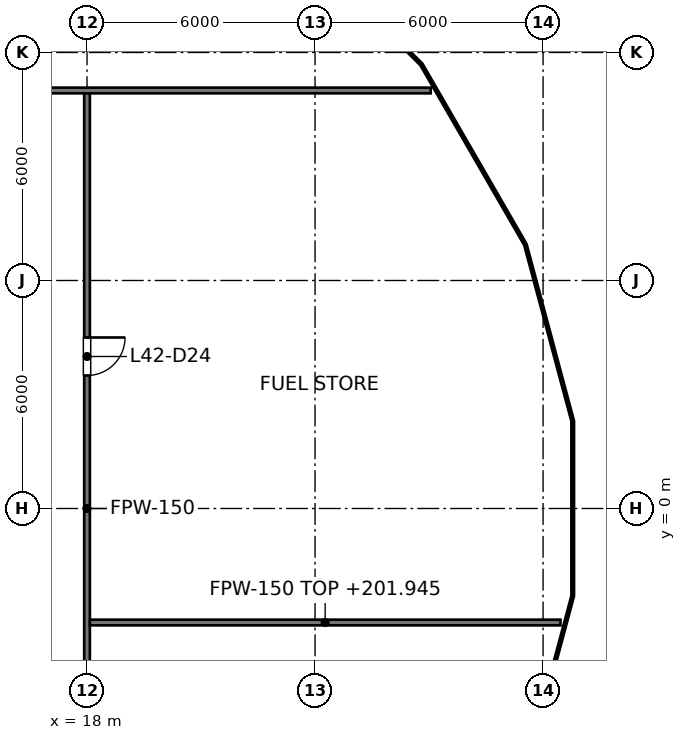
"""IFC4 building model, lengths in metres.
Left out: names, types, materials, properties, quantities, classifications, styles, units other than length and angle.
Written with IfcOpenShell. Run it as: python <this file> out.ifc"""

import sys

from ifc_helpers import new_model, si_unit, direction, frame, frame_2d, origin, place, context, subcontext, project, spatial, rectangle, extrude, element, fill, save


model = new_model("IFC4")
c1 = context("Model", 3, precision=1e-05, world=origin(), true_north=direction((0.0, 1.0)))
c2 = subcontext(c1, "Body", "Model", "MODEL_VIEW")
j1 = project(units=[si_unit("LENGTHUNIT", "METRE"), si_unit("PLANEANGLEUNIT", "RADIAN")], contexts=[c1])
p1 = place(None, origin())
s1 = spatial("IfcSite", under=j1, at=p1, CompositionType="ELEMENT")
p2 = place(p1, origin())
s2 = spatial("IfcBuilding", under=s1, at=p2, CompositionType="ELEMENT")
p3 = place(p2, frame((0.0, 0.0, 197.6)))
s3 = spatial("IfcBuildingStorey", under=s2, at=p3, CompositionType="ELEMENT", Elevation=197.6)
p4 = place(p3, frame((-27.044, 11.0, 0.0), z_axis=(0.0, 0.0, 1.0), x_axis=(1.0, 0.0, 0.0)))
e1 = element("IfcWall", 1, at=p4, inside=s3, PredefinedType="PARTITIONING", context=c2, shape_type="SweptSolid", body=[
    extrude(rectangle(XDim=54.087, YDim=0.15, at=frame_2d((27.044, 0.0))), origin(), (0.0, 0.0, 1.0), 4.277),
])
p5 = place(p4, frame((10.3, 0.0, 0.0)))
e2 = element("IfcOpeningElement", 2, at=p5, cuts=e1, PredefinedType="OPENING", context=c2, shape_type="SweptSolid", body=[
    extrude(rectangle(XDim=1.0, YDim=2.1, at=frame_2d((0.5, 1.05))), frame((0.0, 0.075, 0.0), z_axis=(0.0, -1.0, 0.0), x_axis=(1.0, 0.0, 0.0)), (0.0, 0.0, 1.0), 0.15),
])
p6 = place(p4, frame((17.3, 0.0, 0.0)))
e3 = element("IfcOpeningElement", 3, at=p6, cuts=e1, PredefinedType="OPENING", context=c2, shape_type="SweptSolid", body=[
    extrude(rectangle(XDim=1.0, YDim=2.1, at=frame_2d((0.5, 1.05))), frame((0.0, 0.075, 0.0), z_axis=(0.0, -1.0, 0.0), x_axis=(1.0, 0.0, 0.0)), (0.0, 0.0, 1.0), 0.15),
])
p7 = place(p4, frame((34.85, 0.0, 0.0)))
e4 = element("IfcOpeningElement", 4, at=p7, cuts=e1, PredefinedType="OPENING", context=c2, shape_type="SweptSolid", body=[
    extrude(rectangle(XDim=1.0, YDim=2.1, at=frame_2d((0.5, 1.05))), frame((0.0, 0.075, 0.0), z_axis=(0.0, -1.0, 0.0), x_axis=(1.0, 0.0, 0.0)), (0.0, 0.0, 1.0), 0.15),
])
p8 = place(p4, frame((42.8, 0.0, 0.0)))
e5 = element("IfcOpeningElement", 5, at=p8, cuts=e1, PredefinedType="OPENING", context=c2, shape_type="SweptSolid", body=[
    extrude(rectangle(XDim=1.0, YDim=2.1, at=frame_2d((0.5, 1.05))), frame((0.0, 0.075, 0.0), z_axis=(0.0, -1.0, 0.0), x_axis=(1.0, 0.0, 0.0)), (0.0, 0.0, 1.0), 0.15),
])
p9 = place(p4, frame((25.15, 0.0, 0.0)))
e6 = element("IfcOpeningElement", 6, at=p9, cuts=e1, PredefinedType="OPENING", context=c2, shape_type="SweptSolid", body=[
    extrude(rectangle(XDim=1.8, YDim=2.1, at=frame_2d((0.9, 1.05))), frame((0.0, 0.075, 0.0), z_axis=(0.0, -1.0, 0.0), x_axis=(1.0, 0.0, 0.0)), (0.0, 0.0, 1.0), 0.15),
])
p10 = place(p3, frame((18.0, -10.925, 0.0), z_axis=(0.0, 0.0, 1.0), x_axis=(0.0, 1.0, 0.0)))
e7 = element("IfcWall", 7, at=p10, inside=s3, PredefinedType="PARTITIONING", context=c2, shape_type="SweptSolid", body=[
    extrude(rectangle(XDim=21.85, YDim=0.15, at=frame_2d((10.925, 0.0))), origin(), (0.0, 0.0, 1.0), 4.277),
])
p11 = place(p10, frame((3.45, 0.0, 0.0)))
e8 = element("IfcOpeningElement", 8, at=p11, cuts=e7, PredefinedType="OPENING", context=c2, shape_type="SweptSolid", body=[
    extrude(rectangle(XDim=1.0, YDim=2.1, at=frame_2d((0.5, 1.05))), frame((0.0, 0.075, 0.0), z_axis=(0.0, -1.0, 0.0), x_axis=(1.0, 0.0, 0.0)), (0.0, 0.0, 1.0), 0.15),
])
p12 = place(p10, frame((14.425, 0.0, 0.0)))
e9 = element("IfcOpeningElement", 9, at=p12, cuts=e7, PredefinedType="OPENING", context=c2, shape_type="SweptSolid", body=[
    extrude(rectangle(XDim=1.0, YDim=2.1, at=frame_2d((0.5, 1.05))), frame((0.0, 0.075, 0.0), z_axis=(0.0, -1.0, 0.0), x_axis=(1.0, 0.0, 0.0)), (0.0, 0.0, 1.0), 0.15),
])
p13 = place(p3, frame((18.075, -3.0, 0.0), z_axis=(0.0, 0.0, 1.0), x_axis=(1.0, 0.0, 0.0)))
e10 = element("IfcWall", 10, at=p13, inside=s3, PredefinedType="PARTITIONING", context=c2, shape_type="SweptSolid", body=[
    extrude(rectangle(XDim=12.383, YDim=0.15, at=frame_2d((6.191, 0.0))), origin(), (0.0, 0.0, 1.0), 4.345),
])
p14 = place(p12, origin())
e11 = element("IfcDoor", 11, at=p14, inside=s3, OperationType="SINGLE_SWING_RIGHT", PredefinedType="DOOR", context=c2, shape_type="SweptSolid", body=[
    extrude(rectangle(XDim=1.0, YDim=2.1, at=frame_2d((0.5, 1.05))), frame((0.0, 0.025, 0.0), z_axis=(0.0, -1.0, 0.0), x_axis=(1.0, 0.0, 0.0)), (0.0, 0.0, 1.0), 0.05),
])
fill(e9, e11)
save(model, sys.argv[1])
